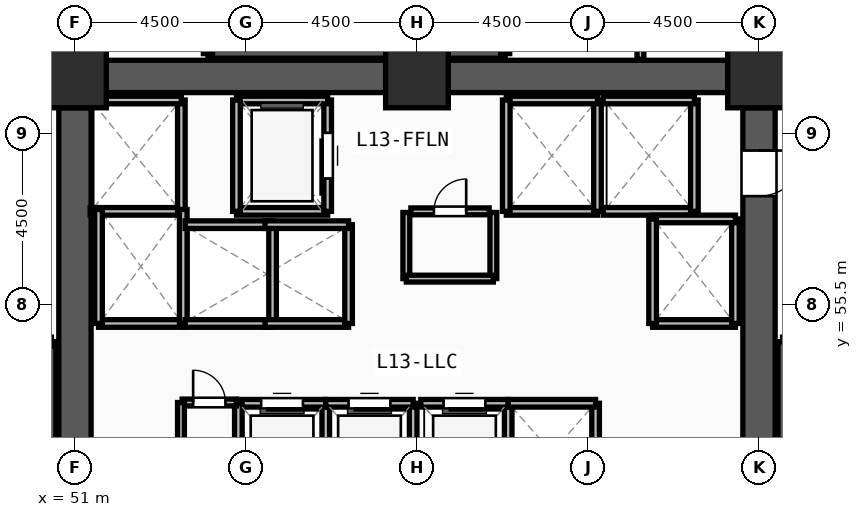
"""IFC4 building model, lengths in metres.
Left out: names, types, materials, properties, quantities, classifications, styles, units other than length and angle.
Written with IfcOpenShell. Run it as: python <this file> out.ifc"""

import sys

from ifc_helpers import new_model, si_unit, direction, frame, frame_2d, origin, origin_2d, place, context, subcontext, project, spatial, rectangle, extrude, source, transform, mapped, element, fill, save


model = new_model("IFC4")
c1 = context("Model", 3, precision=1e-05, world=origin(), true_north=direction((0.0, 1.0)))
c2 = subcontext(c1, "Body", "Model", "MODEL_VIEW")
j1 = project(units=[si_unit("LENGTHUNIT", "METRE"), si_unit("PLANEANGLEUNIT", "RADIAN")], contexts=[c1])
p1 = place(None, origin())
s1 = spatial("IfcSite", under=j1, at=p1, CompositionType="ELEMENT")
p2 = place(p1, origin())
s2 = spatial("IfcBuilding", under=s1, at=p2, CompositionType="ELEMENT")
p3 = place(p2, frame((0.0, 0.0, 51.75)))
s3 = spatial("IfcBuildingStorey", under=s2, at=p3, CompositionType="ELEMENT", Elevation=51.75)
m1 = source(origin(), c2, "Body", "SweptSolid", [
    extrude(rectangle(XDim=1.65, YDim=1.65, at=origin_2d()), origin(), (0.0, 0.0, 1.0), 3.75),
])
for number, where, z_axis, x_axis in (
    (1, (69.0, 61.5, 0.0), (0.0, 0.0, 1.0), (1.0, 0.0, 0.0)),
    (2, (60.0, 61.5, 0.0), (0.0, 0.0, 1.0), (1.0, 0.0, 0.0)),
    (3, (51.0, 61.5, 0.0), (0.0, 0.0, 1.0), (1.0, 0.0, 0.0)),
):
    element("IfcColumn", number, at=place(p3, frame(where, z_axis=z_axis, x_axis=x_axis)), inside=s3, PredefinedType="COLUMN", context=c2, shape_type="MappedRepresentation", body=[
        mapped(m1, transform((0.0, 0.0, 0.0), x_axis=(1.0, 0.0, 0.0), y_axis=(0.0, 1.0, 0.0), z_axis=(0.0, 0.0, 1.0), scale=1.0)),
    ])
for number, where, z_axis, x_axis in (
    (4, (51.825, 61.5, 0.0), (0.0, 0.0, 1.0), (1.0, 0.0, 0.0)),
    (5, (60.825, 61.5, 0.0), (0.0, 0.0, 1.0), (1.0, 0.0, 0.0)),
):
    element("IfcWall", number, at=place(p3, frame(where, z_axis=z_axis, x_axis=x_axis)), inside=s3, PredefinedType="SHEAR", context=c2, shape_type="SweptSolid", body=[
        extrude(rectangle(XDim=7.35, YDim=0.85, at=frame_2d((3.675, 0.0))), origin(), (0.0, 0.0, 1.0), 3.57),
    ])
p4 = place(p3, frame((69.0, 60.675, 0.0), z_axis=(0.0, 0.0, 1.0), x_axis=(0.0, -1.0, 0.0)))
e6 = element("IfcWall", 6, at=p4, inside=s3, PredefinedType="SHEAR", context=c2, shape_type="SweptSolid", body=[
    extrude(rectangle(XDim=13.35, YDim=0.85, at=frame_2d((6.675, 0.0))), origin(), (0.0, 0.0, 1.0), 3.57),
])
m2 = source(origin(), c2, "Body", "SweptSolid", [
    extrude(rectangle(XDim=1.2, YDim=2.2, at=frame_2d((0.6, 1.1))), frame((0.0, 0.435, 0.0), z_axis=(0.0, -1.0, 0.0), x_axis=(1.0, 0.0, 0.0)), (0.0, 0.0, 1.0), 0.87),
])
p5 = place(p4, frame((1.125, 0.0, 0.0)))
e7 = element("IfcOpeningElement", 7, at=p5, cuts=e6, PredefinedType="OPENING", context=c2, shape_type="MappedRepresentation", body=[
    mapped(m2, transform((0.0, 0.0, 0.0), x_axis=(1.0, 0.0, 0.0), y_axis=(0.0, 1.0, 0.0), z_axis=(0.0, 0.0, 1.0), scale=1.0)),
])
p6 = place(p3, frame((51.0, 47.325, 0.0), z_axis=(0.0, 0.0, 1.0), x_axis=(0.0, 1.0, 0.0)))
e8 = element("IfcWall", 8, at=p6, inside=s3, PredefinedType="SHEAR", context=c2, shape_type="SweptSolid", body=[
    extrude(rectangle(XDim=13.35, YDim=0.85, at=frame_2d((6.675, 0.0))), origin(), (0.0, 0.0, 1.0), 3.57),
])
for number, where, z_axis, x_axis in (
    (9, (50.38, 46.7, 0.0), (0.0, 0.0, 1.0), (0.0, 1.0, 0.0)),
    (10, (69.62, 54.52, 0.0), (0.0, 0.0, 1.0), (0.0, -1.0, 0.0)),
    (11, (54.5, 62.1, 0.0), (0.0, 0.0, 1.0), (1.0, 0.0, 0.0)),
):
    element("IfcWall", number, at=place(p3, frame(where, z_axis=z_axis, x_axis=x_axis)), inside=s3, PredefinedType="SOLIDWALL", context=c2, shape_type="SweptSolid", body=[
        extrude(rectangle(XDim=7.82, YDim=0.24, at=frame_2d((3.91, 0.0))), origin(), (0.0, 0.0, 1.0), 3.57),
    ])
for number, where, z_axis, x_axis in (
    (12, (62.32, 62.1, 0.0), (0.0, 0.0, 1.0), (0.0, 1.0, 0.0)),
    (13, (54.5, 65.54, 0.0), (0.0, 0.0, 1.0), (0.0, -1.0, 0.0)),
):
    element("IfcWall", number, at=place(p3, frame(where, z_axis=z_axis, x_axis=x_axis)), inside=s3, PredefinedType="SOLIDWALL", context=c2, shape_type="SweptSolid", body=[
        extrude(rectangle(XDim=3.44, YDim=0.24, at=frame_2d((1.72, 0.0))), origin(), (0.0, 0.0, 1.0), 3.57),
    ])
p7 = place(p3, frame((55.25, 57.95, 0.0), z_axis=(0.0, 0.0, 1.0), x_axis=(1.0, 0.0, 0.0)))
e14 = element("IfcWall", 14, at=p7, inside=s3, PredefinedType="SOLIDWALL", context=c2, shape_type="SweptSolid", body=[
    extrude(rectangle(XDim=2.4, YDim=0.2, at=frame_2d((1.2, 0.0))), origin(), (0.0, 0.0, 1.0), 3.57),
])
p8 = place(p3, frame((57.65, 57.95, 0.0), z_axis=(0.0, 0.0, 1.0), x_axis=(0.0, 1.0, 0.0)))
e15 = element("IfcWall", 15, at=p8, inside=s3, PredefinedType="SOLIDWALL", context=c2, shape_type="SweptSolid", body=[
    extrude(rectangle(XDim=2.93, YDim=0.2, at=frame_2d((1.465, 0.0))), origin(), (0.0, 0.0, 1.0), 3.57),
])
m3 = source(origin(), c2, "Body", "SweptSolid", [
    extrude(rectangle(XDim=1.2, YDim=2.3, at=frame_2d((0.6, 1.15))), frame((0.0, 0.11, 0.0), z_axis=(0.0, -1.0, 0.0), x_axis=(1.0, 0.0, 0.0)), (0.0, 0.0, 1.0), 0.22),
])
p9 = place(p8, frame((0.865, 0.0, 0.0)))
e16 = element("IfcOpeningElement", 16, at=p9, cuts=e15, PredefinedType="OPENING", context=c2, shape_type="MappedRepresentation", body=[
    mapped(m3, transform((0.0, 0.0, 0.0), x_axis=(1.0, 0.0, 0.0), y_axis=(0.0, 1.0, 0.0), z_axis=(0.0, 0.0, 1.0), scale=1.0)),
])
p10 = place(p3, frame((57.65, 60.88, 0.0), z_axis=(0.0, 0.0, 1.0), x_axis=(-1.0, 0.0, 0.0)))
e17 = element("IfcWall", 17, at=p10, inside=s3, PredefinedType="SOLIDWALL", context=c2, shape_type="SweptSolid", body=[
    extrude(rectangle(XDim=2.4, YDim=0.2, at=frame_2d((1.2, 0.0))), origin(), (0.0, 0.0, 1.0), 3.57),
])
p11 = place(p3, frame((55.25, 60.88, 0.0), z_axis=(0.0, 0.0, 1.0), x_axis=(0.0, -1.0, 0.0)))
e18 = element("IfcWall", 18, at=p11, inside=s3, PredefinedType="SOLIDWALL", context=c2, shape_type="SweptSolid", body=[
    extrude(rectangle(XDim=2.93, YDim=0.2, at=frame_2d((1.465, 0.0))), origin(), (0.0, 0.0, 1.0), 3.57),
])
p12 = place(p3, frame((62.35, 57.95, 0.0), z_axis=(0.0, 0.0, 1.0), x_axis=(1.0, 0.0, 0.0)))
e19 = element("IfcWall", 19, at=p12, inside=s3, PredefinedType="SOLIDWALL", context=c2, shape_type="SweptSolid", body=[
    extrude(rectangle(XDim=2.4, YDim=0.2, at=frame_2d((1.2, 0.0))), origin(), (0.0, 0.0, 1.0), 3.57),
])
p13 = place(p3, frame((64.75, 57.95, 0.0), z_axis=(0.0, 0.0, 1.0), x_axis=(0.0, 1.0, 0.0)))
e20 = element("IfcWall", 20, at=p13, inside=s3, PredefinedType="SOLIDWALL", context=c2, shape_type="SweptSolid", body=[
    extrude(rectangle(XDim=2.93, YDim=0.2, at=frame_2d((1.465, 0.0))), origin(), (0.0, 0.0, 1.0), 3.57),
])
p14 = place(p3, frame((64.75, 60.88, 0.0), z_axis=(0.0, 0.0, 1.0), x_axis=(-1.0, 0.0, 0.0)))
e21 = element("IfcWall", 21, at=p14, inside=s3, PredefinedType="SOLIDWALL", context=c2, shape_type="SweptSolid", body=[
    extrude(rectangle(XDim=2.4, YDim=0.2, at=frame_2d((1.2, 0.0))), origin(), (0.0, 0.0, 1.0), 3.57),
])
p15 = place(p3, frame((62.35, 60.88, 0.0), z_axis=(0.0, 0.0, 1.0), x_axis=(0.0, -1.0, 0.0)))
e22 = element("IfcWall", 22, at=p15, inside=s3, PredefinedType="SOLIDWALL", context=c2, shape_type="SweptSolid", body=[
    extrude(rectangle(XDim=2.93, YDim=0.2, at=frame_2d((1.465, 0.0))), origin(), (0.0, 0.0, 1.0), 3.57),
])
p16 = place(p3, frame((64.9, 57.95, 0.0), z_axis=(0.0, 0.0, 1.0), x_axis=(1.0, 0.0, 0.0)))
e23 = element("IfcWall", 23, at=p16, inside=s3, PredefinedType="SOLIDWALL", context=c2, shape_type="SweptSolid", body=[
    extrude(rectangle(XDim=2.4, YDim=0.2, at=frame_2d((1.2, 0.0))), origin(), (0.0, 0.0, 1.0), 3.57),
])
p17 = place(p3, frame((67.3, 57.95, 0.0), z_axis=(0.0, 0.0, 1.0), x_axis=(0.0, 1.0, 0.0)))
e24 = element("IfcWall", 24, at=p17, inside=s3, PredefinedType="SOLIDWALL", context=c2, shape_type="SweptSolid", body=[
    extrude(rectangle(XDim=2.93, YDim=0.2, at=frame_2d((1.465, 0.0))), origin(), (0.0, 0.0, 1.0), 3.57),
])
for number, where, z_axis, x_axis in (
    (25, (67.3, 60.88, 0.0), (0.0, 0.0, 1.0), (-1.0, 0.0, 0.0)),
    (26, (51.4, 57.95, 0.0), (0.0, 0.0, 1.0), (1.0, 0.0, 0.0)),
):
    element("IfcWall", number, at=place(p3, frame(where, z_axis=z_axis, x_axis=x_axis)), inside=s3, PredefinedType="SOLIDWALL", context=c2, shape_type="SweptSolid", body=[
        extrude(rectangle(XDim=2.4, YDim=0.2, at=frame_2d((1.2, 0.0))), origin(), (0.0, 0.0, 1.0), 3.57),
    ])
p18 = place(p3, frame((53.8, 57.95, 0.0), z_axis=(0.0, 0.0, 1.0), x_axis=(0.0, 1.0, 0.0)))
e27 = element("IfcWall", 27, at=p18, inside=s3, PredefinedType="SOLIDWALL", context=c2, shape_type="SweptSolid", body=[
    extrude(rectangle(XDim=2.93, YDim=0.2, at=frame_2d((1.465, 0.0))), origin(), (0.0, 0.0, 1.0), 3.57),
])
p19 = place(p3, frame((53.8, 60.88, 0.0), z_axis=(0.0, 0.0, 1.0), x_axis=(-1.0, 0.0, 0.0)))
e28 = element("IfcWall", 28, at=p19, inside=s3, PredefinedType="SOLIDWALL", context=c2, shape_type="SweptSolid", body=[
    extrude(rectangle(XDim=2.4, YDim=0.2, at=frame_2d((1.2, 0.0))), origin(), (0.0, 0.0, 1.0), 3.57),
])
p20 = place(p3, frame((51.62, 55.0, 0.0), z_axis=(0.0, 0.0, 1.0), x_axis=(1.0, 0.0, 0.0)))
e29 = element("IfcWall", 29, at=p20, inside=s3, PredefinedType="SOLIDWALL", context=c2, shape_type="SweptSolid", body=[
    extrude(rectangle(XDim=2.23, YDim=0.2, at=frame_2d((1.115, 0.0))), origin(), (0.0, 0.0, 1.0), 3.57),
])
for number, where, z_axis, x_axis in (
    (30, (53.85, 55.0, 0.0), (0.0, 0.0, 1.0), (0.0, 1.0, 0.0)),
    (31, (51.62, 58.0, 0.0), (0.0, 0.0, 1.0), (0.0, -1.0, 0.0)),
):
    element("IfcWall", number, at=place(p3, frame(where, z_axis=z_axis, x_axis=x_axis)), inside=s3, PredefinedType="SOLIDWALL", context=c2, shape_type="SweptSolid", body=[
        extrude(rectangle(XDim=3.0, YDim=0.2, at=frame_2d((1.5, 0.0))), origin(), (0.0, 0.0, 1.0), 3.57),
    ])
p21 = place(p3, frame((66.2, 55.0, 0.0), z_axis=(0.0, 0.0, 1.0), x_axis=(1.0, 0.0, 0.0)))
e32 = element("IfcWall", 32, at=p21, inside=s3, PredefinedType="SOLIDWALL", context=c2, shape_type="SweptSolid", body=[
    extrude(rectangle(XDim=2.18, YDim=0.2, at=frame_2d((1.09, 0.0))), origin(), (0.0, 0.0, 1.0), 3.57),
])
p22 = place(p3, frame((68.38, 55.0, 0.0), z_axis=(0.0, 0.0, 1.0), x_axis=(0.0, 1.0, 0.0)))
e33 = element("IfcWall", 33, at=p22, inside=s3, PredefinedType="SOLIDWALL", context=c2, shape_type="SweptSolid", body=[
    extrude(rectangle(XDim=2.75, YDim=0.2, at=frame_2d((1.375, 0.0))), origin(), (0.0, 0.0, 1.0), 3.57),
])
p23 = place(p3, frame((68.38, 57.75, 0.0), z_axis=(0.0, 0.0, 1.0), x_axis=(-1.0, 0.0, 0.0)))
e34 = element("IfcWall", 34, at=p23, inside=s3, PredefinedType="SOLIDWALL", context=c2, shape_type="SweptSolid", body=[
    extrude(rectangle(XDim=2.18, YDim=0.2, at=frame_2d((1.09, 0.0))), origin(), (0.0, 0.0, 1.0), 3.57),
])
p24 = place(p3, frame((66.2, 57.75, 0.0), z_axis=(0.0, 0.0, 1.0), x_axis=(0.0, -1.0, 0.0)))
e35 = element("IfcWall", 35, at=p24, inside=s3, PredefinedType="SOLIDWALL", context=c2, shape_type="SweptSolid", body=[
    extrude(rectangle(XDim=2.75, YDim=0.2, at=frame_2d((1.375, 0.0))), origin(), (0.0, 0.0, 1.0), 3.57),
])
p25 = place(p3, frame((57.6, 50.3, 0.0), z_axis=(0.0, 0.0, 1.0), x_axis=(0.0, 1.0, 0.0)))
e36 = element("IfcWall", 36, at=p25, inside=s3, PredefinedType="SOLIDWALL", context=c2, shape_type="SweptSolid", body=[
    extrude(rectangle(XDim=2.6, YDim=0.2, at=frame_2d((1.3, 0.0))), origin(), (0.0, 0.0, 1.0), 3.57),
])
p26 = place(p3, frame((57.6, 52.9, 0.0), z_axis=(0.0, 0.0, 1.0), x_axis=(-1.0, 0.0, 0.0)))
e37 = element("IfcWall", 37, at=p26, inside=s3, PredefinedType="SOLIDWALL", context=c2, shape_type="SweptSolid", body=[
    extrude(rectangle(XDim=2.3, YDim=0.2, at=frame_2d((1.15, 0.0))), origin(), (0.0, 0.0, 1.0), 3.57),
])
m4 = source(origin(), c2, "Body", "SweptSolid", [
    extrude(rectangle(XDim=1.1, YDim=2.2, at=frame_2d((0.55, 1.1))), frame((0.0, 0.11, 0.0), z_axis=(0.0, -1.0, 0.0), x_axis=(1.0, 0.0, 0.0)), (0.0, 0.0, 1.0), 0.22),
])
p27 = place(p26, frame((0.6, 0.0, 0.0)))
e38 = element("IfcOpeningElement", 38, at=p27, cuts=e37, PredefinedType="OPENING", context=c2, shape_type="MappedRepresentation", body=[
    mapped(m4, transform((0.0, 0.0, 0.0), x_axis=(1.0, 0.0, 0.0), y_axis=(0.0, 1.0, 0.0), z_axis=(0.0, 0.0, 1.0), scale=1.0)),
])
for number, where, z_axis, x_axis in (
    (39, (55.3, 52.9, 0.0), (0.0, 0.0, 1.0), (0.0, -1.0, 0.0)),
    (40, (59.9, 50.3, 0.0), (0.0, 0.0, 1.0), (0.0, 1.0, 0.0)),
):
    element("IfcWall", number, at=place(p3, frame(where, z_axis=z_axis, x_axis=x_axis)), inside=s3, PredefinedType="SOLIDWALL", context=c2, shape_type="SweptSolid", body=[
        extrude(rectangle(XDim=2.6, YDim=0.2, at=frame_2d((1.3, 0.0))), origin(), (0.0, 0.0, 1.0), 3.57),
    ])
p28 = place(p3, frame((59.9, 52.9, 0.0), z_axis=(0.0, 0.0, 1.0), x_axis=(-1.0, 0.0, 0.0)))
e41 = element("IfcWall", 41, at=p28, inside=s3, PredefinedType="SOLIDWALL", context=c2, shape_type="SweptSolid", body=[
    extrude(rectangle(XDim=2.3, YDim=0.2, at=frame_2d((1.15, 0.0))), origin(), (0.0, 0.0, 1.0), 3.57),
])
p29 = place(p28, frame((0.6, 0.0, 0.0)))
e42 = element("IfcOpeningElement", 42, at=p29, cuts=e41, PredefinedType="OPENING", context=c2, shape_type="MappedRepresentation", body=[
    mapped(m4, transform((0.0, 0.0, 0.0), x_axis=(1.0, 0.0, 0.0), y_axis=(0.0, 1.0, 0.0), z_axis=(0.0, 0.0, 1.0), scale=1.0)),
])
p30 = place(p3, frame((62.4, 50.3, 0.0), z_axis=(0.0, 0.0, 1.0), x_axis=(0.0, 1.0, 0.0)))
e43 = element("IfcWall", 43, at=p30, inside=s3, PredefinedType="SOLIDWALL", context=c2, shape_type="SweptSolid", body=[
    extrude(rectangle(XDim=2.6, YDim=0.2, at=frame_2d((1.3, 0.0))), origin(), (0.0, 0.0, 1.0), 3.57),
])
p31 = place(p3, frame((62.4, 52.9, 0.0), z_axis=(0.0, 0.0, 1.0), x_axis=(-1.0, 0.0, 0.0)))
e44 = element("IfcWall", 44, at=p31, inside=s3, PredefinedType="SOLIDWALL", context=c2, shape_type="SweptSolid", body=[
    extrude(rectangle(XDim=2.3, YDim=0.2, at=frame_2d((1.15, 0.0))), origin(), (0.0, 0.0, 1.0), 3.57),
])
p32 = place(p31, frame((0.6, 0.0, 0.0)))
e45 = element("IfcOpeningElement", 45, at=p32, cuts=e44, PredefinedType="OPENING", context=c2, shape_type="MappedRepresentation", body=[
    mapped(m4, transform((0.0, 0.0, 0.0), x_axis=(1.0, 0.0, 0.0), y_axis=(0.0, 1.0, 0.0), z_axis=(0.0, 0.0, 1.0), scale=1.0)),
])
p33 = place(p3, frame((64.7, 50.3, 0.0), z_axis=(0.0, 0.0, 1.0), x_axis=(0.0, 1.0, 0.0)))
e46 = element("IfcWall", 46, at=p33, inside=s3, PredefinedType="SOLIDWALL", context=c2, shape_type="SweptSolid", body=[
    extrude(rectangle(XDim=2.6, YDim=0.2, at=frame_2d((1.3, 0.0))), origin(), (0.0, 0.0, 1.0), 3.57),
])
for number, where, z_axis, x_axis in (
    (47, (64.7, 52.9, 0.0), (0.0, 0.0, 1.0), (-1.0, 0.0, 0.0)),
    (48, (53.9, 55.0, 0.0), (0.0, 0.0, 1.0), (1.0, 0.0, 0.0)),
):
    element("IfcWall", number, at=place(p3, frame(where, z_axis=z_axis, x_axis=x_axis)), inside=s3, PredefinedType="SOLIDWALL", context=c2, shape_type="SweptSolid", body=[
        extrude(rectangle(XDim=2.3, YDim=0.2, at=frame_2d((1.15, 0.0))), origin(), (0.0, 0.0, 1.0), 3.57),
    ])
p34 = place(p3, frame((56.2, 55.0, 0.0), z_axis=(0.0, 0.0, 1.0), x_axis=(0.0, 1.0, 0.0)))
e49 = element("IfcWall", 49, at=p34, inside=s3, PredefinedType="SOLIDWALL", context=c2, shape_type="SweptSolid", body=[
    extrude(rectangle(XDim=2.6, YDim=0.2, at=frame_2d((1.3, 0.0))), origin(), (0.0, 0.0, 1.0), 3.57),
])
p35 = place(p3, frame((56.2, 57.6, 0.0), z_axis=(0.0, 0.0, 1.0), x_axis=(-1.0, 0.0, 0.0)))
e50 = element("IfcWall", 50, at=p35, inside=s3, PredefinedType="SOLIDWALL", context=c2, shape_type="SweptSolid", body=[
    extrude(rectangle(XDim=2.3, YDim=0.2, at=frame_2d((1.15, 0.0))), origin(), (0.0, 0.0, 1.0), 3.57),
])
p36 = place(p3, frame((56.0, 55.0, 0.0), z_axis=(0.0, 0.0, 1.0), x_axis=(1.0, 0.0, 0.0)))
e51 = element("IfcWall", 51, at=p36, inside=s3, PredefinedType="SOLIDWALL", context=c2, shape_type="SweptSolid", body=[
    extrude(rectangle(XDim=2.2, YDim=0.2, at=frame_2d((1.1, 0.0))), origin(), (0.0, 0.0, 1.0), 3.57),
])
p37 = place(p3, frame((58.2, 55.0, 0.0), z_axis=(0.0, 0.0, 1.0), x_axis=(0.0, 1.0, 0.0)))
e52 = element("IfcWall", 52, at=p37, inside=s3, PredefinedType="SOLIDWALL", context=c2, shape_type="SweptSolid", body=[
    extrude(rectangle(XDim=2.6, YDim=0.2, at=frame_2d((1.3, 0.0))), origin(), (0.0, 0.0, 1.0), 3.57),
])
p38 = place(p3, frame((58.2, 57.6, 0.0), z_axis=(0.0, 0.0, 1.0), x_axis=(-1.0, 0.0, 0.0)))
e53 = element("IfcWall", 53, at=p38, inside=s3, PredefinedType="SOLIDWALL", context=c2, shape_type="SweptSolid", body=[
    extrude(rectangle(XDim=2.2, YDim=0.2, at=frame_2d((1.1, 0.0))), origin(), (0.0, 0.0, 1.0), 3.57),
])
p39 = place(p3, frame((59.84, 57.95, 0.0), z_axis=(0.0, 0.0, 1.0), x_axis=(1.0, 0.0, 0.0)))
e54 = element("IfcWall", 54, at=p39, inside=s3, PredefinedType="PARTITIONING", context=c2, shape_type="SweptSolid", body=[
    extrude(rectangle(XDim=2.06, YDim=0.18, at=frame_2d((1.03, 0.0))), origin(), (0.0, 0.0, 1.0), 3.57),
])
m5 = source(origin(), c2, "Body", "SweptSolid", [
    extrude(rectangle(XDim=0.85, YDim=2.1, at=frame_2d((0.425, 1.05))), frame((0.0, 0.1, 0.0), z_axis=(0.0, -1.0, 0.0), x_axis=(1.0, 0.0, 0.0)), (0.0, 0.0, 1.0), 0.2),
])
p40 = place(p39, frame((0.605, 0.0, 0.0)))
e55 = element("IfcOpeningElement", 55, at=p40, cuts=e54, PredefinedType="OPENING", context=c2, shape_type="MappedRepresentation", body=[
    mapped(m5, transform((0.0, 0.0, 0.0), x_axis=(1.0, 0.0, 0.0), y_axis=(0.0, 1.0, 0.0), z_axis=(0.0, 0.0, 1.0), scale=1.0)),
])
p41 = place(p3, frame((53.82, 52.92, 0.0), z_axis=(0.0, 0.0, 1.0), x_axis=(1.0, 0.0, 0.0)))
e56 = element("IfcWall", 56, at=p41, inside=s3, PredefinedType="PARTITIONING", context=c2, shape_type="SweptSolid", body=[
    extrude(rectangle(XDim=1.43, YDim=0.18, at=frame_2d((0.715, 0.0))), origin(), (0.0, 0.0, 1.0), 3.57),
])
p42 = place(p41, frame((0.29, 0.0, 0.0)))
e57 = element("IfcOpeningElement", 57, at=p42, cuts=e56, PredefinedType="OPENING", context=c2, shape_type="MappedRepresentation", body=[
    mapped(m5, transform((0.0, 0.0, 0.0), x_axis=(1.0, 0.0, 0.0), y_axis=(0.0, 1.0, 0.0), z_axis=(0.0, 0.0, 1.0), scale=1.0)),
])
for number, where, z_axis, x_axis in (
    (58, (59.72, 56.18, 0.0), (0.0, 0.0, 1.0), (0.0, 1.0, 0.0)),
    (59, (62.01, 56.18, 0.0), (0.0, 0.0, 1.0), (0.0, 1.0, 0.0)),
):
    element("IfcWall", number, at=place(p3, frame(where, z_axis=z_axis, x_axis=x_axis)), inside=s3, PredefinedType="PARTITIONING", context=c2, shape_type="SweptSolid", body=[
        extrude(rectangle(XDim=1.74, YDim=0.18, at=frame_2d((0.87, 0.0))), origin(), (0.0, 0.0, 1.0), 3.57),
    ])
p43 = place(p3, frame((59.72, 56.18, 0.0), z_axis=(0.0, 0.0, 1.0), x_axis=(1.0, 0.0, 0.0)))
e60 = element("IfcWall", 60, at=p43, inside=s3, PredefinedType="PARTITIONING", context=c2, shape_type="SweptSolid", body=[
    extrude(rectangle(XDim=2.29, YDim=0.18, at=frame_2d((1.145, 0.0))), origin(), (0.0, 0.0, 1.0), 3.57),
])
p44 = place(p3, frame((53.79, 50.35, 0.0), z_axis=(0.0, 0.0, 1.0), x_axis=(0.0, 1.0, 0.0)))
e61 = element("IfcWall", 61, at=p44, inside=s3, PredefinedType="PARTITIONING", context=c2, shape_type="SweptSolid", body=[
    extrude(rectangle(XDim=2.57, YDim=0.18, at=frame_2d((1.285, 0.0))), origin(), (0.0, 0.0, 1.0), 3.57),
])
for number, where, z_axis, x_axis in (
    (62, (65.88, 61.95, 0.0), (0.0, 0.0, 1.0), (0.0, 1.0, 0.0)),
    (63, (69.46, 61.95, 0.0), (0.0, 0.0, 1.0), (0.0, 1.0, 0.0)),
):
    element("IfcWall", number, at=place(p3, frame(where, z_axis=z_axis, x_axis=x_axis)), inside=s3, PredefinedType="PARTITIONING", context=c2, shape_type="SweptSolid", body=[
        extrude(rectangle(XDim=3.63, YDim=0.18, at=frame_2d((1.815, 0.0))), origin(), (0.0, 0.0, 1.0), 3.57),
    ])
m6 = source(origin(), c2, "Body", "SweptSolid", [
    extrude(rectangle(XDim=1.2, YDim=2.2, at=frame_2d((0.6, 1.1))), frame((0.0, 0.025, 0.0), z_axis=(0.0, -1.0, 0.0), x_axis=(1.0, 0.0, 0.0)), (0.0, 0.0, 1.0), 0.05),
])
p45 = place(p5, origin())
e64 = element("IfcDoor", 64, at=p45, inside=s3, OperationType="SINGLE_SWING_LEFT", PredefinedType="DOOR", context=c2, shape_type="MappedRepresentation", body=[
    mapped(m6, transform((0.0, 0.0, 0.0), x_axis=(1.0, 0.0, 0.0), y_axis=(0.0, 1.0, 0.0), z_axis=(0.0, 0.0, 1.0), scale=1.0)),
])
fill(e7, e64)
m7 = source(origin(), c2, "Body", "SweptSolid", [
    extrude(rectangle(XDim=1.2, YDim=2.3, at=frame_2d((0.6, 1.15))), frame((0.0, 0.025, 0.0), z_axis=(0.0, -1.0, 0.0), x_axis=(1.0, 0.0, 0.0)), (0.0, 0.0, 1.0), 0.05),
])
p46 = place(p9, origin())
e65 = element("IfcDoor", 65, at=p46, inside=s3, OperationType="SLIDING_TO_LEFT", PredefinedType="DOOR", context=c2, shape_type="MappedRepresentation", body=[
    mapped(m7, transform((0.0, 0.0, 0.0), x_axis=(1.0, 0.0, 0.0), y_axis=(0.0, 1.0, 0.0), z_axis=(0.0, 0.0, 1.0), scale=1.0)),
])
fill(e16, e65)
m8 = source(origin(), c2, "Body", "SweptSolid", [
    extrude(rectangle(XDim=1.1, YDim=2.2, at=frame_2d((0.55, 1.1))), frame((0.0, 0.025, 0.0), z_axis=(0.0, -1.0, 0.0), x_axis=(1.0, 0.0, 0.0)), (0.0, 0.0, 1.0), 0.05),
])
p47 = place(p27, origin())
e66 = element("IfcDoor", 66, at=p47, inside=s3, OperationType="SLIDING_TO_LEFT", PredefinedType="DOOR", context=c2, shape_type="MappedRepresentation", body=[
    mapped(m8, transform((0.0, 0.0, 0.0), x_axis=(1.0, 0.0, 0.0), y_axis=(0.0, 1.0, 0.0), z_axis=(0.0, 0.0, 1.0), scale=1.0)),
])
fill(e38, e66)
p48 = place(p29, origin())
e67 = element("IfcDoor", 67, at=p48, inside=s3, OperationType="SLIDING_TO_LEFT", PredefinedType="DOOR", context=c2, shape_type="MappedRepresentation", body=[
    mapped(m8, transform((0.0, 0.0, 0.0), x_axis=(1.0, 0.0, 0.0), y_axis=(0.0, 1.0, 0.0), z_axis=(0.0, 0.0, 1.0), scale=1.0)),
])
fill(e42, e67)
p49 = place(p32, origin())
e68 = element("IfcDoor", 68, at=p49, inside=s3, OperationType="SLIDING_TO_LEFT", PredefinedType="DOOR", context=c2, shape_type="MappedRepresentation", body=[
    mapped(m8, transform((0.0, 0.0, 0.0), x_axis=(1.0, 0.0, 0.0), y_axis=(0.0, 1.0, 0.0), z_axis=(0.0, 0.0, 1.0), scale=1.0)),
])
fill(e45, e68)
m9 = source(origin(), c2, "Body", "SweptSolid", [
    extrude(rectangle(XDim=0.85, YDim=2.1, at=frame_2d((0.425, 1.05))), frame((0.0, 0.025, 0.0), z_axis=(0.0, -1.0, 0.0), x_axis=(1.0, 0.0, 0.0)), (0.0, 0.0, 1.0), 0.05),
])
p50 = place(p40, origin())
e69 = element("IfcDoor", 69, at=p50, inside=s3, OperationType="SINGLE_SWING_RIGHT", PredefinedType="DOOR", context=c2, shape_type="MappedRepresentation", body=[
    mapped(m9, transform((0.0, 0.0, 0.0), x_axis=(1.0, 0.0, 0.0), y_axis=(0.0, 1.0, 0.0), z_axis=(0.0, 0.0, 1.0), scale=1.0)),
])
fill(e55, e69)
p51 = place(p42, origin())
e70 = element("IfcDoor", 70, at=p51, inside=s3, OperationType="SINGLE_SWING_LEFT", PredefinedType="DOOR", context=c2, shape_type="MappedRepresentation", body=[
    mapped(m9, transform((0.0, 0.0, 0.0), x_axis=(1.0, 0.0, 0.0), y_axis=(0.0, 1.0, 0.0), z_axis=(0.0, 0.0, 1.0), scale=1.0)),
])
fill(e57, e70)
save(model, sys.argv[1])
